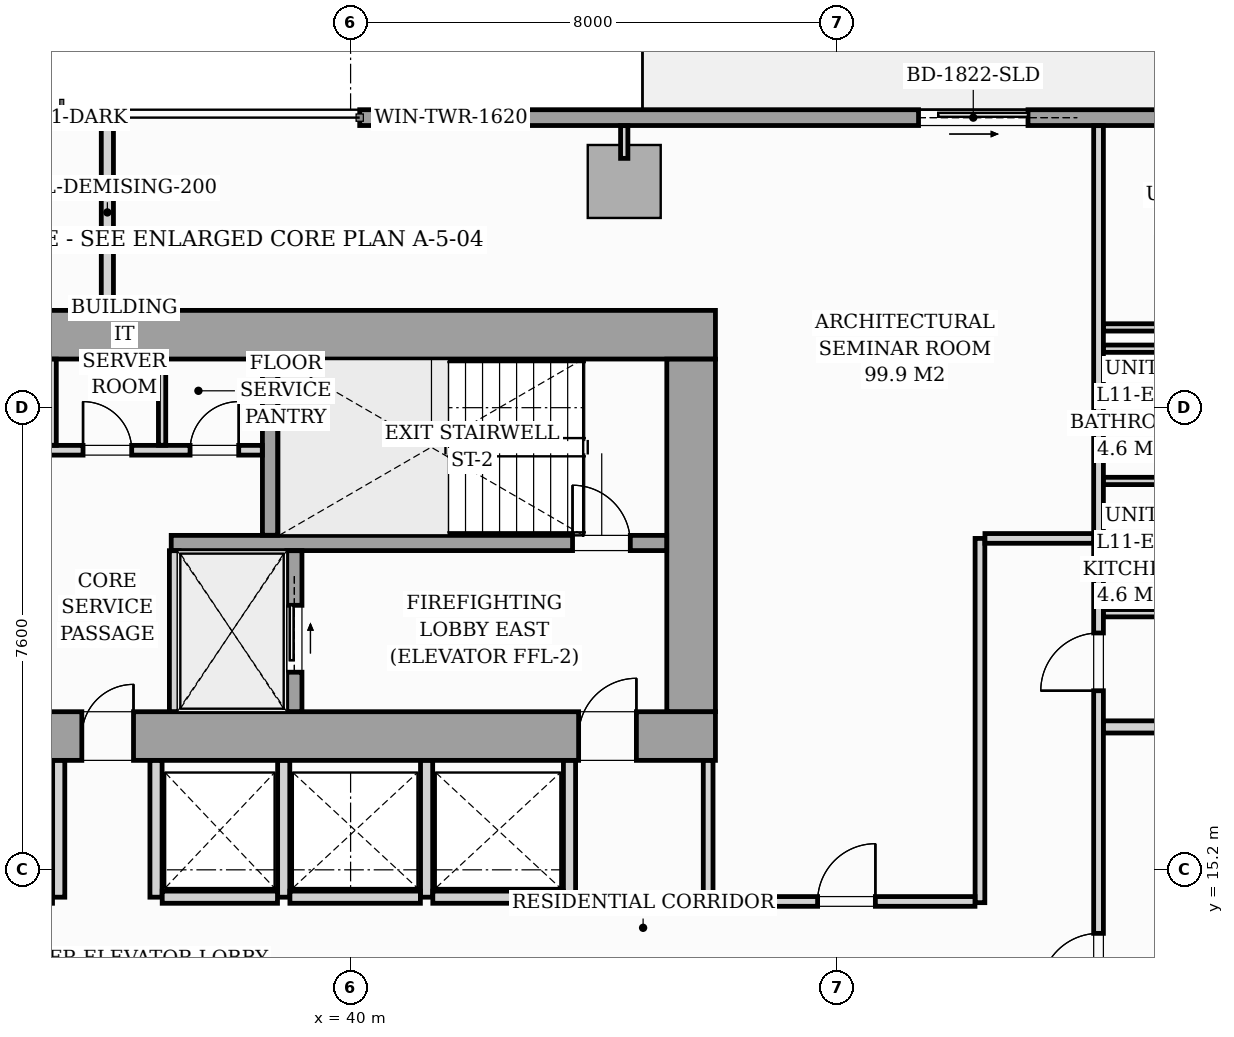
"""IFC4 building model, lengths in metres.
Left out: names, types, materials, properties, quantities, classifications, styles, units other than length and angle.
Written with IfcOpenShell. Run it as: python <this file> out.ifc"""

import sys

from ifc_helpers import new_model, si_unit, direction, frame, frame_2d, origin, origin_2d, place, context, subcontext, project, spatial, rectangle, i_section, extrude, source, transform, mapped, element, fill, save


model = new_model("IFC4")
c1 = context("Model", 3, precision=1e-05, world=origin(), true_north=direction((0.0, 1.0)))
c2 = subcontext(c1, "Body", "Model", "MODEL_VIEW")
j1 = project(units=[si_unit("LENGTHUNIT", "METRE"), si_unit("PLANEANGLEUNIT", "RADIAN")], contexts=[c1])
p1 = place(None, origin())
s1 = spatial("IfcSite", under=j1, at=p1, CompositionType="ELEMENT")
p2 = place(p1, origin())
s2 = spatial("IfcBuilding", under=s1, at=p2, CompositionType="ELEMENT")
p3 = place(p2, frame((0.0, 0.0, 42.2)))
s3 = spatial("IfcBuildingStorey", under=s2, at=p3, CompositionType="ELEMENT", Elevation=42.2)
m1 = source(origin(), c2, "Body", "SweptSolid", [
    extrude(i_section(OverallWidth=0.437, OverallDepth=0.514, WebThickness=0.061, FlangeThickness=0.097, FilletRadius=0.018, at=origin_2d()), origin(), (0.0, 0.0, 1.0), 3.196),
])
for number, where, z_axis, x_axis in (
    (1, (38.88, 17.4, 0.002), (0.0, 0.0, 1.0), (1.0, 0.0, 0.0)),
    (2, (45.6, 17.4, 0.002), (0.0, 0.0, 1.0), (1.0, 0.0, 0.0)),
    (3, (38.88, 24.0, 0.002), (0.0, 0.0, 1.0), (1.0, 0.0, 0.0)),
    (4, (45.6, 24.0, 0.002), (0.0, 0.0, 1.0), (1.0, 0.0, 0.0)),
):
    element("IfcColumn", number, at=place(p3, frame(where, z_axis=z_axis, x_axis=x_axis)), inside=s3, PredefinedType="PILASTER", context=c2, shape_type="MappedRepresentation", body=[
        mapped(m1, transform((0.0, 0.0, 0.0), scale=1.0)),
    ])
m2 = source(origin(), c2, "Body", "SweptSolid", [
    extrude(rectangle(XDim=1.2, YDim=1.2, at=origin_2d()), origin(), (0.0, 0.0, 1.0), 3.196),
])
p4 = place(p3, frame((44.5, 26.52, 0.002), z_axis=(0.0, 0.0, 1.0), x_axis=(1.0, 0.0, 0.0)))
e5 = element("IfcColumn", 5, at=p4, inside=s3, PredefinedType="COLUMN", context=c2, shape_type="MappedRepresentation", body=[
    mapped(m2, transform((0.0, 0.0, 0.0), scale=1.0)),
])
p5 = place(p3, frame((40.15, 27.57, 0.0), z_axis=(0.0, 0.0, 1.0), x_axis=(1.0, 0.0, 0.0)))
e6 = element("IfcWall", 6, at=p5, inside=s3, PredefinedType="STANDARD", context=c2, shape_type="SweptSolid", body=[
    extrude(rectangle(XDim=17.15, YDim=0.26, at=frame_2d((8.575, 0.0))), origin(), (0.0, 0.0, 1.0), 2.94),
])
p6 = place(p5, frame((9.19, 0.0, 0.0)))
e7 = element("IfcOpeningElement", 7, at=p6, cuts=e6, PredefinedType="OPENING", context=c2, shape_type="SweptSolid", body=[
    extrude(rectangle(XDim=1.8, YDim=2.06, at=frame_2d((0.9, 1.03))), frame((0.0, 0.14, 0.0), z_axis=(0.0, -1.0, 0.0), x_axis=(1.0, 0.0, 0.0)), (0.0, 0.0, 1.0), 0.28),
])
p7 = place(p5, frame((0.7, 0.0, 0.65)))
e8 = element("IfcOpeningElement", 8, at=p7, cuts=e6, PredefinedType="OPENING", context=c2, shape_type="SweptSolid", body=[
    extrude(rectangle(XDim=1.6, YDim=1.5, at=frame_2d((0.8, 0.75))), frame((0.0, 0.14, 0.0), z_axis=(0.0, -1.0, 0.0), x_axis=(1.0, 0.0, 0.0)), (0.0, 0.0, 1.0), 0.28),
])
p8 = place(p3, frame((26.0, 17.4, 0.0), z_axis=(0.0, 0.0, 1.0), x_axis=(1.0, 0.0, 0.0)))
e9 = element("IfcWall", 9, at=p8, inside=s3, PredefinedType="SHEAR", context=c2, shape_type="SweptSolid", body=[
    extrude(rectangle(XDim=20.0, YDim=0.8, at=frame_2d((10.0, 0.0))), origin(), (0.0, 0.0, 1.0), 3.2),
])
p9 = place(p8, frame((1.15, 0.0, 0.0)))
e10 = element("IfcOpeningElement", 10, at=p9, cuts=e9, PredefinedType="OPENING", context=c2, shape_type="SweptSolid", body=[
    extrude(rectangle(XDim=0.95, YDim=2.06, at=frame_2d((0.475, 1.03))), frame((0.0, 0.41, 0.0), z_axis=(0.0, -1.0, 0.0), x_axis=(1.0, 0.0, 0.0)), (0.0, 0.0, 1.0), 0.82),
])
p10 = place(p8, frame((9.58, 0.0, 0.0)))
e11 = element("IfcOpeningElement", 11, at=p10, cuts=e9, PredefinedType="OPENING", context=c2, shape_type="SweptSolid", body=[
    extrude(rectangle(XDim=0.85, YDim=2.0, at=frame_2d((0.425, 1.0))), frame((0.0, 0.41, 0.0), z_axis=(0.0, -1.0, 0.0), x_axis=(1.0, 0.0, 0.0)), (0.0, 0.0, 1.0), 0.82),
])
p11 = place(p8, frame((17.75, 0.0, 0.0)))
e12 = element("IfcOpeningElement", 12, at=p11, cuts=e9, PredefinedType="OPENING", context=c2, shape_type="SweptSolid", body=[
    extrude(rectangle(XDim=0.95, YDim=2.06, at=frame_2d((0.475, 1.03))), frame((0.0, 0.41, 0.0), z_axis=(0.0, -1.0, 0.0), x_axis=(1.0, 0.0, 0.0)), (0.0, 0.0, 1.0), 0.82),
])
p12 = place(p3, frame((26.0, 24.0, 0.0), z_axis=(0.0, 0.0, 1.0), x_axis=(1.0, 0.0, 0.0)))
e13 = element("IfcWall", 13, at=p12, inside=s3, PredefinedType="SHEAR", context=c2, shape_type="SweptSolid", body=[
    extrude(rectangle(XDim=20.0, YDim=0.8, at=frame_2d((10.0, 0.0))), origin(), (0.0, 0.0, 1.0), 3.2),
])
p13 = place(p3, frame((45.6, 17.802, 0.0), z_axis=(0.0, 0.0, 1.0), x_axis=(0.0, 1.0, 0.0)))
e14 = element("IfcWall", 14, at=p13, inside=s3, PredefinedType="SHEAR", context=c2, shape_type="SweptSolid", body=[
    extrude(rectangle(XDim=5.796, YDim=0.8, at=frame_2d((2.898, 0.0))), origin(), (0.0, 0.0, 1.0), 3.2),
])
p14 = place(p3, frame((37.05, 20.575, 0.0), z_axis=(0.0, 0.0, 1.0), x_axis=(1.0, 0.0, 0.0)))
e15 = element("IfcWall", 15, at=p14, inside=s3, PredefinedType="SOLIDWALL", context=c2, shape_type="SweptSolid", body=[
    extrude(rectangle(XDim=8.148, YDim=0.25, at=frame_2d((4.074, 0.0))), origin(), (0.0, 0.0, 1.0), 3.2),
])
p15 = place(p14, frame((6.6, 0.0, 0.0)))
e16 = element("IfcOpeningElement", 16, at=p15, cuts=e15, PredefinedType="OPENING", context=c2, shape_type="SweptSolid", body=[
    extrude(rectangle(XDim=0.95, YDim=2.06, at=frame_2d((0.475, 1.03))), frame((0.0, 0.135, 0.0), z_axis=(0.0, -1.0, 0.0), x_axis=(1.0, 0.0, 0.0)), (0.0, 0.0, 1.0), 0.27),
])
p16 = place(p3, frame((38.675, 20.702, 0.0), z_axis=(0.0, 0.0, 1.0), x_axis=(0.0, 1.0, 0.0)))
e17 = element("IfcWall", 17, at=p16, inside=s3, PredefinedType="SOLIDWALL", context=c2, shape_type="SweptSolid", body=[
    extrude(rectangle(XDim=2.896, YDim=0.25, at=frame_2d((1.448, 0.0))), origin(), (0.0, 0.0, 1.0), 3.2),
])
p17 = place(p3, frame((37.1, 17.802, 0.0), z_axis=(0.0, 0.0, 1.0), x_axis=(0.0, 1.0, 0.0)))
e18 = element("IfcWall", 18, at=p17, inside=s3, PredefinedType="PARTITIONING", context=c2, shape_type="SweptSolid", body=[
    extrude(rectangle(XDim=2.646, YDim=0.16, at=frame_2d((1.323, 0.0))), origin(), (0.0, 0.0, 1.0), 2.94),
])
p18 = place(p3, frame((39.075, 17.802, 0.0), z_axis=(0.0, 0.0, 1.0), x_axis=(0.0, 1.0, 0.0)))
e19 = element("IfcWall", 19, at=p18, inside=s3, PredefinedType="SOLIDWALL", context=c2, shape_type="SweptSolid", body=[
    extrude(rectangle(XDim=2.646, YDim=0.25, at=frame_2d((1.323, 0.0))), origin(), (0.0, 0.0, 1.0), 3.2),
])
p19 = place(p18, frame((0.648, 0.0, 0.0)))
e20 = element("IfcOpeningElement", 20, at=p19, cuts=e19, PredefinedType="OPENING", context=c2, shape_type="SweptSolid", body=[
    extrude(rectangle(XDim=1.1, YDim=2.08, at=frame_2d((0.55, 1.04))), frame((0.0, 0.135, 0.0), z_axis=(0.0, -1.0, 0.0), x_axis=(1.0, 0.0, 0.0)), (0.0, 0.0, 1.0), 0.27),
])
p20 = place(p3, frame((33.452, 22.1, 0.0), z_axis=(0.0, 0.0, 1.0), x_axis=(1.0, 0.0, 0.0)))
e21 = element("IfcWall", 21, at=p20, inside=s3, PredefinedType="PARTITIONING", context=c2, shape_type="SweptSolid", body=[
    extrude(rectangle(XDim=5.096, YDim=0.16, at=frame_2d((2.548, 0.0))), origin(), (0.0, 0.0, 1.0), 2.94),
])
p21 = place(p20, frame((0.388, 0.0, 0.0)))
e22 = element("IfcOpeningElement", 22, at=p21, cuts=e21, PredefinedType="OPENING", context=c2, shape_type="SweptSolid", body=[
    extrude(rectangle(XDim=0.8, YDim=2.05, at=frame_2d((0.4, 1.025))), frame((0.0, 0.09, 0.0), z_axis=(0.0, -1.0, 0.0), x_axis=(1.0, 0.0, 0.0)), (0.0, 0.0, 1.0), 0.18),
])
p22 = place(p20, frame((2.148, 0.0, 0.0)))
e23 = element("IfcOpeningElement", 23, at=p22, cuts=e21, PredefinedType="OPENING", context=c2, shape_type="SweptSolid", body=[
    extrude(rectangle(XDim=0.8, YDim=2.05, at=frame_2d((0.4, 1.025))), frame((0.0, 0.09, 0.0), z_axis=(0.0, -1.0, 0.0), x_axis=(1.0, 0.0, 0.0)), (0.0, 0.0, 1.0), 0.18),
])
p23 = place(p20, frame((3.908, 0.0, 0.0)))
e24 = element("IfcOpeningElement", 24, at=p23, cuts=e21, PredefinedType="OPENING", context=c2, shape_type="SweptSolid", body=[
    extrude(rectangle(XDim=0.8, YDim=2.05, at=frame_2d((0.4, 1.025))), frame((0.0, 0.09, 0.0), z_axis=(0.0, -1.0, 0.0), x_axis=(1.0, 0.0, 0.0)), (0.0, 0.0, 1.0), 0.18),
])
for number, where, z_axis, x_axis in (
    (25, (35.1, 22.182, 0.0), (0.0, 0.0, 1.0), (0.0, 1.0, 0.0)),
    (26, (36.9, 22.182, 0.0), (0.0, 0.0, 1.0), (0.0, 1.0, 0.0)),
):
    element("IfcWall", number, at=place(p3, frame(where, z_axis=z_axis, x_axis=x_axis)), inside=s3, PredefinedType="PARTITIONING", context=c2, shape_type="SweptSolid", body=[
        extrude(rectangle(XDim=1.416, YDim=0.12, at=frame_2d((0.708, 0.0))), origin(), (0.0, 0.0, 1.0), 2.94),
    ])
for number, where, z_axis, x_axis in (
    (27, (35.2, 14.75, 0.0), (0.0, 0.0, 1.0), (0.0, 1.0, 0.0)),
    (28, (36.8, 14.75, 0.0), (0.0, 0.0, 1.0), (0.0, 1.0, 0.0)),
    (29, (38.9, 14.75, 0.0), (0.0, 0.0, 1.0), (0.0, 1.0, 0.0)),
):
    element("IfcWall", number, at=place(p3, frame(where, z_axis=z_axis, x_axis=x_axis)), inside=s3, PredefinedType="PARTITIONING", context=c2, shape_type="SweptSolid", body=[
        extrude(rectangle(XDim=2.248, YDim=0.2, at=frame_2d((1.124, 0.0))), origin(), (0.0, 0.0, 1.0), 2.94),
    ])
p24 = place(p3, frame((36.902, 14.75, 0.0), z_axis=(0.0, 0.0, 1.0), x_axis=(1.0, 0.0, 0.0)))
e30 = element("IfcWall", 30, at=p24, inside=s3, PredefinedType="PARTITIONING", context=c2, shape_type="SweptSolid", body=[
    extrude(rectangle(XDim=1.896, YDim=0.2, at=frame_2d((0.948, 0.0))), origin(), (0.0, 0.0, 1.0), 2.94),
])
for number, where, z_axis, x_axis in (
    (31, (41.25, 14.75, 0.0), (0.0, 0.0, 1.0), (0.0, 1.0, 0.0)),
    (32, (43.6, 14.75, 0.0), (0.0, 0.0, 1.0), (0.0, 1.0, 0.0)),
):
    element("IfcWall", number, at=place(p3, frame(where, z_axis=z_axis, x_axis=x_axis)), inside=s3, PredefinedType="PARTITIONING", context=c2, shape_type="SweptSolid", body=[
        extrude(rectangle(XDim=2.248, YDim=0.2, at=frame_2d((1.124, 0.0))), origin(), (0.0, 0.0, 1.0), 2.94),
    ])
for number, where, z_axis, x_axis in (
    (33, (39.002, 14.75, 0.0), (0.0, 0.0, 1.0), (1.0, 0.0, 0.0)),
    (34, (41.352, 14.75, 0.0), (0.0, 0.0, 1.0), (1.0, 0.0, 0.0)),
):
    element("IfcWall", number, at=place(p3, frame(where, z_axis=z_axis, x_axis=x_axis)), inside=s3, PredefinedType="PARTITIONING", context=c2, shape_type="SweptSolid", body=[
        extrude(rectangle(XDim=2.146, YDim=0.2, at=frame_2d((1.073, 0.0))), origin(), (0.0, 0.0, 1.0), 2.94),
    ])
p25 = place(p3, frame((52.3, 12.712, 0.0), z_axis=(0.0, 0.0, 1.0), x_axis=(0.0, 1.0, 0.0)))
e35 = element("IfcWall", 35, at=p25, inside=s3, PredefinedType="PARTITIONING", context=c2, shape_type="SweptSolid", body=[
    extrude(rectangle(XDim=14.726, YDim=0.16, at=frame_2d((7.363, 0.0))), origin(), (0.0, 0.0, 1.0), 2.94),
])
p26 = place(p25, frame((0.493, 0.0, 0.0)))
e36 = element("IfcOpeningElement", 36, at=p26, cuts=e35, PredefinedType="OPENING", context=c2, shape_type="SweptSolid", body=[
    extrude(rectangle(XDim=0.95, YDim=2.06, at=frame_2d((0.475, 1.03))), frame((0.0, 0.09, 0.0), z_axis=(0.0, -1.0, 0.0), x_axis=(1.0, 0.0, 0.0)), (0.0, 0.0, 1.0), 0.18),
])
p27 = place(p25, frame((5.433, 0.0, 0.0)))
e37 = element("IfcOpeningElement", 37, at=p27, cuts=e35, PredefinedType="OPENING", context=c2, shape_type="SweptSolid", body=[
    extrude(rectangle(XDim=0.95, YDim=2.06, at=frame_2d((0.475, 1.03))), frame((0.0, 0.09, 0.0), z_axis=(0.0, -1.0, 0.0), x_axis=(1.0, 0.0, 0.0)), (0.0, 0.0, 1.0), 0.18),
])
p28 = place(p3, frame((36.0, 24.402, 0.0), z_axis=(0.0, 0.0, 1.0), x_axis=(0.0, 1.0, 0.0)))
e38 = element("IfcWall", 38, at=p28, inside=s3, PredefinedType="PARTITIONING", context=c2, shape_type="SweptSolid", body=[
    extrude(rectangle(XDim=3.218, YDim=0.2, at=frame_2d((1.609, 0.0))), origin(), (0.0, 0.0, 1.0), 2.94),
])
p29 = place(p3, frame((52.382, 17.55, 0.0), z_axis=(0.0, 0.0, 1.0), x_axis=(1.0, 0.0, 0.0)))
e39 = element("IfcWall", 39, at=p29, inside=s3, PredefinedType="PARTITIONING", context=c2, shape_type="SweptSolid", body=[
    extrude(rectangle(XDim=7.338, YDim=0.2, at=frame_2d((3.669, 0.0))), origin(), (0.0, 0.0, 1.0), 2.94),
])
for number, where, z_axis, x_axis in (
    (40, (52.382, 21.595, 0.0), (0.0, 0.0, 1.0), (1.0, 0.0, 0.0)),
    (41, (52.382, 19.42, 0.0), (0.0, 0.0, 1.0), (1.0, 0.0, 0.0)),
    (42, (52.382, 23.77, 0.0), (0.0, 0.0, 1.0), (1.0, 0.0, 0.0)),
):
    element("IfcWall", number, at=place(p3, frame(where, z_axis=z_axis, x_axis=x_axis)), inside=s3, PredefinedType="PARTITIONING", context=c2, shape_type="SweptSolid", body=[
        extrude(rectangle(XDim=2.256, YDim=0.12, at=frame_2d((1.128, 0.0))), origin(), (0.0, 0.0, 1.0), 2.94),
    ])
p30 = place(p3, frame((52.382, 24.12, 0.0), z_axis=(0.0, 0.0, 1.0), x_axis=(1.0, 0.0, 0.0)))
e43 = element("IfcWall", 43, at=p30, inside=s3, PredefinedType="PARTITIONING", context=c2, shape_type="SweptSolid", body=[
    extrude(rectangle(XDim=7.338, YDim=0.12, at=frame_2d((3.669, 0.0))), origin(), (0.0, 0.0, 1.0), 2.94),
])
p31 = place(p30, frame((3.253, 0.0, 0.0)))
e44 = element("IfcOpeningElement", 44, at=p31, cuts=e43, PredefinedType="OPENING", context=c2, shape_type="SweptSolid", body=[
    extrude(rectangle(XDim=0.85, YDim=2.05, at=frame_2d((0.425, 1.025))), frame((0.0, 0.07, 0.0), z_axis=(0.0, -1.0, 0.0), x_axis=(1.0, 0.0, 0.0)), (0.0, 0.0, 1.0), 0.14),
])
p32 = place(p3, frame((50.35, 14.66, 0.0), z_axis=(0.0, 0.0, 1.0), x_axis=(0.0, 1.0, 0.0)))
e45 = element("IfcWall", 45, at=p32, inside=s3, PredefinedType="PARTITIONING", context=c2, shape_type="SweptSolid", body=[
    extrude(rectangle(XDim=5.99, YDim=0.16, at=frame_2d((2.995, 0.0))), origin(), (0.0, 0.0, 1.0), 2.94),
])
p33 = place(p3, frame((50.432, 20.65, 0.0), z_axis=(0.0, 0.0, 1.0), x_axis=(1.0, 0.0, 0.0)))
e46 = element("IfcWall", 46, at=p33, inside=s3, PredefinedType="PARTITIONING", context=c2, shape_type="SweptSolid", body=[
    extrude(rectangle(XDim=1.786, YDim=0.16, at=frame_2d((0.893, 0.0))), origin(), (0.0, 0.0, 1.0), 2.94),
])
p34 = place(p3, frame((45.84, 14.68, 0.0), z_axis=(0.0, 0.0, 1.0), x_axis=(1.0, 0.0, 0.0)))
e47 = element("IfcWall", 47, at=p34, inside=s3, PredefinedType="PARTITIONING", context=c2, shape_type="SweptSolid", body=[
    extrude(rectangle(XDim=4.428, YDim=0.16, at=frame_2d((2.214, 0.0))), origin(), (0.0, 0.0, 1.0), 2.94),
])
p35 = place(p34, frame((1.84, 0.0, 0.0)))
e48 = element("IfcOpeningElement", 48, at=p35, cuts=e47, PredefinedType="OPENING", context=c2, shape_type="SweptSolid", body=[
    extrude(rectangle(XDim=0.95, YDim=2.06, at=frame_2d((0.475, 1.03))), frame((0.0, 0.09, 0.0), z_axis=(0.0, -1.0, 0.0), x_axis=(1.0, 0.0, 0.0)), (0.0, 0.0, 1.0), 0.18),
])
p36 = place(p3, frame((45.88, 14.762, 0.0), z_axis=(0.0, 0.0, 1.0), x_axis=(0.0, 1.0, 0.0)))
e49 = element("IfcWall", 49, at=p36, inside=s3, PredefinedType="PARTITIONING", context=c2, shape_type="SweptSolid", body=[
    extrude(rectangle(XDim=2.236, YDim=0.16, at=frame_2d((1.118, 0.0))), origin(), (0.0, 0.0, 1.0), 2.94),
])
p37 = place(p3, frame((44.5, 26.9, 0.0), z_axis=(0.0, 0.0, 1.0), x_axis=(0.0, 1.0, 0.0)))
e50 = element("IfcWall", 50, at=p37, inside=s3, PredefinedType="PARTITIONING", context=c2, shape_type="SweptSolid", body=[
    extrude(rectangle(XDim=0.538, YDim=0.12, at=frame_2d((0.269, 0.0))), origin(), (0.0, 0.0, 1.0), 2.94),
])
m3 = source(origin(), c2, "Body", "SweptSolid", [
    extrude(rectangle(XDim=1.8, YDim=2.06, at=frame_2d((0.9, 1.03))), frame((0.0, 0.025, 0.0), z_axis=(0.0, -1.0, 0.0), x_axis=(1.0, 0.0, 0.0)), (0.0, 0.0, 1.0), 0.05),
])
p38 = place(p6, origin())
e51 = element("IfcDoor", 51, at=p38, inside=s3, OperationType="SLIDING_TO_RIGHT", PredefinedType="DOOR", context=c2, shape_type="MappedRepresentation", body=[
    mapped(m3, transform((0.0, 0.0, 0.0), scale=1.0)),
])
fill(e7, e51)
m4 = source(origin(), c2, "Body", "SweptSolid", [
    extrude(rectangle(XDim=1.6, YDim=1.5, at=frame_2d((0.8, 0.75))), frame((0.0, 0.03, 0.0), z_axis=(0.0, -1.0, 0.0), x_axis=(1.0, 0.0, 0.0)), (0.0, 0.0, 1.0), 0.06),
])
p39 = place(p7, origin())
e52 = element("IfcWindow", 52, at=p39, inside=s3, PartitioningType="SINGLE_PANEL", PredefinedType="WINDOW", context=c2, shape_type="MappedRepresentation", body=[
    mapped(m4, transform((0.0, 0.0, 0.0), scale=1.0)),
])
fill(e8, e52)
m5 = source(origin(), c2, "Body", "SweptSolid", [
    extrude(rectangle(XDim=0.85, YDim=2.0, at=frame_2d((0.425, 1.0))), frame((0.0, 0.025, 0.0), z_axis=(0.0, -1.0, 0.0), x_axis=(1.0, 0.0, 0.0)), (0.0, 0.0, 1.0), 0.05),
])
p40 = place(p10, origin())
e53 = element("IfcDoor", 53, at=p40, inside=s3, OperationType="SINGLE_SWING_RIGHT", PredefinedType="DOOR", context=c2, shape_type="MappedRepresentation", body=[
    mapped(m5, transform((0.0, 0.0, 0.0), scale=1.0)),
])
fill(e11, e53)
m6 = source(origin(), c2, "Body", "SweptSolid", [
    extrude(rectangle(XDim=0.95, YDim=2.06, at=frame_2d((0.475, 1.03))), frame((0.0, 0.025, 0.0), z_axis=(0.0, -1.0, 0.0), x_axis=(1.0, 0.0, 0.0)), (0.0, 0.0, 1.0), 0.05),
])
p41 = place(p11, origin())
e54 = element("IfcDoor", 54, at=p41, inside=s3, OperationType="SINGLE_SWING_RIGHT", PredefinedType="DOOR", context=c2, shape_type="MappedRepresentation", body=[
    mapped(m6, transform((0.0, 0.0, 0.0), scale=1.0)),
])
fill(e12, e54)
p42 = place(p15, origin())
e55 = element("IfcDoor", 55, at=p42, inside=s3, OperationType="SINGLE_SWING_LEFT", PredefinedType="DOOR", context=c2, shape_type="MappedRepresentation", body=[
    mapped(m6, transform((0.0, 0.0, 0.0), scale=1.0)),
])
fill(e16, e55)
m7 = source(origin(), c2, "Body", "SweptSolid", [
    extrude(rectangle(XDim=1.1, YDim=2.08, at=frame_2d((0.55, 1.04))), frame((0.0, 0.025, 0.0), z_axis=(0.0, -1.0, 0.0), x_axis=(1.0, 0.0, 0.0)), (0.0, 0.0, 1.0), 0.05),
])
p43 = place(p19, origin())
e56 = element("IfcDoor", 56, at=p43, inside=s3, OperationType="SLIDING_TO_RIGHT", PredefinedType="DOOR", context=c2, shape_type="MappedRepresentation", body=[
    mapped(m7, transform((0.0, 0.0, 0.0), scale=1.0)),
])
fill(e20, e56)
m8 = source(origin(), c2, "Body", "SweptSolid", [
    extrude(rectangle(XDim=0.8, YDim=2.05, at=frame_2d((0.4, 1.025))), frame((0.0, 0.025, 0.0), z_axis=(0.0, -1.0, 0.0), x_axis=(1.0, 0.0, 0.0)), (0.0, 0.0, 1.0), 0.05),
])
p44 = place(p22, origin())
e57 = element("IfcDoor", 57, at=p44, inside=s3, OperationType="SINGLE_SWING_LEFT", PredefinedType="DOOR", context=c2, shape_type="MappedRepresentation", body=[
    mapped(m8, transform((0.0, 0.0, 0.0), scale=1.0)),
])
fill(e23, e57)
p45 = place(p23, origin())
e58 = element("IfcDoor", 58, at=p45, inside=s3, OperationType="SINGLE_SWING_RIGHT", PredefinedType="DOOR", context=c2, shape_type="MappedRepresentation", body=[
    mapped(m8, transform((0.0, 0.0, 0.0), scale=1.0)),
])
fill(e24, e58)
m9 = source(origin(), c2, "Body", "SweptSolid", [
    extrude(rectangle(XDim=0.95, YDim=2.06, at=frame_2d((0.475, 1.03))), frame((0.0, 0.025, 0.0), z_axis=(0.0, -1.0, 0.0), x_axis=(1.0, 0.0, 0.0)), (0.0, 0.0, 1.0), 0.05),
])
p46 = place(p26, origin())
e59 = element("IfcDoor", 59, at=p46, inside=s3, OperationType="SINGLE_SWING_LEFT", PredefinedType="DOOR", context=c2, shape_type="MappedRepresentation", body=[
    mapped(m9, transform((0.0, 0.0, 0.0), scale=1.0)),
])
fill(e36, e59)
p47 = place(p27, origin())
e60 = element("IfcDoor", 60, at=p47, inside=s3, OperationType="SINGLE_SWING_LEFT", PredefinedType="DOOR", context=c2, shape_type="MappedRepresentation", body=[
    mapped(m9, transform((0.0, 0.0, 0.0), scale=1.0)),
])
fill(e37, e60)
p48 = place(p35, origin())
e61 = element("IfcDoor", 61, at=p48, inside=s3, OperationType="SINGLE_SWING_RIGHT", PredefinedType="DOOR", context=c2, shape_type="MappedRepresentation", body=[
    mapped(m9, transform((0.0, 0.0, 0.0), scale=1.0)),
])
fill(e48, e61)
save(model, sys.argv[1])
